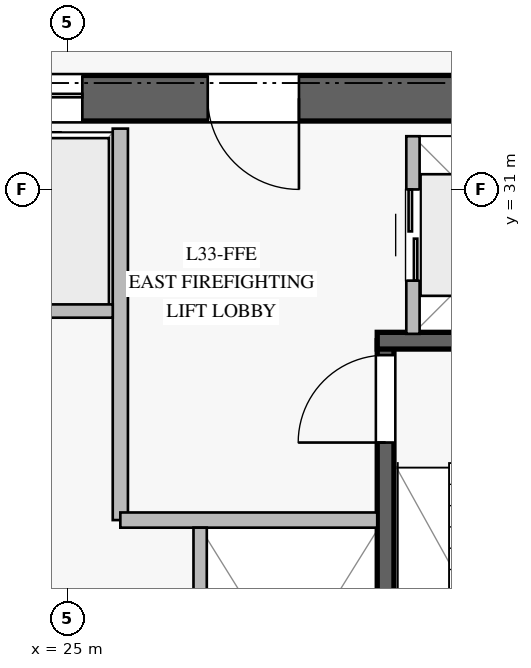
"""IFC4 building model, lengths in metres.
Left out: names, types, materials, properties, quantities, classifications, styles, units other than length and angle.
Written with IfcOpenShell. Run it as: python <this file> out.ifc"""

import sys

from ifc_helpers import new_model, si_unit, direction, frame, frame_2d, origin, place, context, subcontext, project, spatial, rectangle, extrude, element, fill, save


model = new_model("IFC4")
c1 = context("Model", 3, precision=1e-05, world=origin(), true_north=direction((0.0, 1.0)))
c2 = subcontext(c1, "Body", "Model", "MODEL_VIEW")
j1 = project(units=[si_unit("LENGTHUNIT", "METRE"), si_unit("PLANEANGLEUNIT", "RADIAN")], contexts=[c1])
p1 = place(None, origin())
s1 = spatial("IfcSite", under=j1, at=p1, CompositionType="ELEMENT")
p2 = place(p1, origin())
s2 = spatial("IfcBuilding", under=s1, at=p2, CompositionType="ELEMENT")
p3 = place(p2, frame((0.0, 0.0, 138.4)))
s3 = spatial("IfcBuildingStorey", under=s2, at=p3, CompositionType="ELEMENT", Elevation=138.4)
p4 = place(p3, frame((33.1, 32.2, 0.0), z_axis=(0.0, 0.0, 1.0), x_axis=(-1.0, 0.0, 0.0)))
e1 = element("IfcWall", 1, at=p4, inside=s3, PredefinedType="SHEAR", context=c2, shape_type="SweptSolid", body=[
    extrude(rectangle(XDim=16.2, YDim=0.6, at=frame_2d((8.1, 0.0))), origin(), (0.0, 0.0, 1.0), 3.76),
])
p5 = place(p4, frame((5.05, 0.0, 0.0)))
e2 = element("IfcOpeningElement", 2, at=p5, cuts=e1, PredefinedType="OPENING", context=c2, shape_type="SweptSolid", body=[
    extrude(rectangle(XDim=1.2, YDim=2.25, at=frame_2d((0.6, 1.125))), frame((0.0, 0.31, 0.0), z_axis=(0.0, -1.0, 0.0), x_axis=(1.0, 0.0, 0.0)), (0.0, 0.0, 1.0), 0.62),
])
p6 = place(p4, frame((11.85, 0.0, 0.0)))
e3 = element("IfcOpeningElement", 3, at=p6, cuts=e1, PredefinedType="OPENING", context=c2, shape_type="SweptSolid", body=[
    extrude(rectangle(XDim=1.1, YDim=2.2, at=frame_2d((0.55, 1.1))), frame((0.0, 0.31, 0.0), z_axis=(0.0, -1.0, 0.0), x_axis=(1.0, 0.0, 0.0)), (0.0, 0.0, 1.0), 0.62),
])
p7 = place(p4, frame((9.875, 0.0, 0.0)))
e4 = element("IfcOpeningElement", 4, at=p7, cuts=e1, PredefinedType="OPENING", context=c2, shape_type="SweptSolid", body=[
    extrude(rectangle(XDim=1.1, YDim=2.2, at=frame_2d((0.55, 1.1))), frame((0.0, 0.31, 0.0), z_axis=(0.0, -1.0, 0.0), x_axis=(1.0, 0.0, 0.0)), (0.0, 0.0, 1.0), 0.62),
])
p8 = place(p4, frame((7.9, 0.0, 0.0)))
e5 = element("IfcOpeningElement", 5, at=p8, cuts=e1, PredefinedType="OPENING", context=c2, shape_type="SweptSolid", body=[
    extrude(rectangle(XDim=1.1, YDim=2.2, at=frame_2d((0.55, 1.1))), frame((0.0, 0.31, 0.0), z_axis=(0.0, -1.0, 0.0), x_axis=(1.0, 0.0, 0.0)), (0.0, 0.0, 1.0), 0.62),
])
p9 = place(p3, frame((29.19, 21.79, 0.0), z_axis=(0.0, 0.0, 1.0), x_axis=(0.0, 1.0, 0.0)))
e6 = element("IfcWall", 6, at=p9, inside=s3, PredefinedType="SOLIDWALL", context=c2, shape_type="SweptSolid", body=[
    extrude(rectangle(XDim=7.22, YDim=0.22, at=frame_2d((3.61, 0.0))), origin(), (0.0, 0.0, 1.0), 3.76),
])
p10 = place(p9, frame((5.88, 0.0, 0.0)))
e7 = element("IfcOpeningElement", 7, at=p10, cuts=e6, PredefinedType="OPENING", context=c2, shape_type="SweptSolid", body=[
    extrude(rectangle(XDim=1.15, YDim=2.2, at=frame_2d((0.575, 1.1))), frame((0.0, 0.12, 0.0), z_axis=(0.0, -1.0, 0.0), x_axis=(1.0, 0.0, 0.0)), (0.0, 0.0, 1.0), 0.24),
])
p11 = place(p3, frame((29.08, 29.01, 0.0), z_axis=(0.0, 0.0, 1.0), x_axis=(1.0, 0.0, 0.0)))
e8 = element("IfcWall", 8, at=p11, inside=s3, PredefinedType="SOLIDWALL", context=c2, shape_type="SweptSolid", body=[
    extrude(rectangle(XDim=3.72, YDim=0.22, at=frame_2d((1.86, 0.0))), origin(), (0.0, 0.0, 1.0), 3.76),
])
p12 = place(p3, frame((25.7, 26.65, 0.0), z_axis=(0.0, 0.0, 1.0), x_axis=(0.0, 1.0, 0.0)))
e9 = element("IfcWall", 9, at=p12, inside=s3, PredefinedType="PARTITIONING", context=c2, shape_type="SweptSolid", body=[
    extrude(rectangle(XDim=5.15, YDim=0.2, at=frame_2d((2.575, 0.0))), origin(), (0.0, 0.0, 1.0), 3.76),
])
p13 = place(p3, frame((25.7, 26.65, 0.0), z_axis=(0.0, 0.0, 1.0), x_axis=(1.0, 0.0, 0.0)))
e10 = element("IfcWall", 10, at=p13, inside=s3, PredefinedType="PARTITIONING", context=c2, shape_type="SweptSolid", body=[
    extrude(rectangle(XDim=3.38, YDim=0.2, at=frame_2d((1.69, 0.0))), origin(), (0.0, 0.0, 1.0), 3.76),
])
for number, where, z_axis, x_axis in (
    (11, (23.7, 29.4, 0.0), (0.0, 0.0, 1.0), (1.0, 0.0, 0.0)),
    (12, (26.75, 24.65, 0.0), (0.0, 0.0, 1.0), (0.0, 1.0, 0.0)),
):
    element("IfcWall", number, at=place(p3, frame(where, z_axis=z_axis, x_axis=x_axis)), inside=s3, PredefinedType="PARTITIONING", context=c2, shape_type="SweptSolid", body=[
        extrude(rectangle(XDim=1.9, YDim=0.175, at=frame_2d((0.95, 0.0))), origin(), (0.0, 0.0, 1.0), 3.76),
    ])
p14 = place(p3, frame((29.55, 29.1, 0.0), z_axis=(0.0, 0.0, 1.0), x_axis=(0.0, 1.0, 0.0)))
e13 = element("IfcWall", 13, at=p14, inside=s3, PredefinedType="PARTITIONING", context=c2, shape_type="SweptSolid", body=[
    extrude(rectangle(XDim=2.6, YDim=0.175, at=frame_2d((1.3, 0.0))), origin(), (0.0, 0.0, 1.0), 3.76),
])
p15 = place(p14, frame((0.7, 0.0, 0.0)))
e14 = element("IfcOpeningElement", 14, at=p15, cuts=e13, PredefinedType="OPENING", context=c2, shape_type="SweptSolid", body=[
    extrude(rectangle(XDim=1.2, YDim=2.2, at=frame_2d((0.6, 1.1))), frame((0.0, 0.098, 0.0), z_axis=(0.0, -1.0, 0.0), x_axis=(1.0, 0.0, 0.0)), (0.0, 0.0, 1.0), 0.195),
])
p16 = place(p10, origin())
e15 = element("IfcDoor", 15, at=p16, inside=s3, OperationType="SINGLE_SWING_LEFT", PredefinedType="DOOR", context=c2, shape_type="SweptSolid", body=[
    extrude(rectangle(XDim=1.15, YDim=2.2, at=frame_2d((0.575, 1.1))), frame((0.0, 0.025, 0.0), z_axis=(0.0, -1.0, 0.0), x_axis=(1.0, 0.0, 0.0)), (0.0, 0.0, 1.0), 0.05),
])
fill(e7, e15)
p17 = place(p5, origin())
e16 = element("IfcDoor", 16, at=p17, inside=s3, OperationType="SINGLE_SWING_LEFT", PredefinedType="DOOR", context=c2, shape_type="SweptSolid", body=[
    extrude(rectangle(XDim=1.2, YDim=2.25, at=frame_2d((0.6, 1.125))), frame((0.0, 0.025, 0.0), z_axis=(0.0, -1.0, 0.0), x_axis=(1.0, 0.0, 0.0)), (0.0, 0.0, 1.0), 0.05),
])
fill(e2, e16)
p18 = place(p8, origin())
e17 = element("IfcDoor", 17, at=p18, inside=s3, OperationType="DOUBLE_DOOR_SLIDING", PredefinedType="DOOR", context=c2, shape_type="SweptSolid", body=[
    extrude(rectangle(XDim=1.1, YDim=2.2, at=frame_2d((0.55, 1.1))), frame((0.0, 0.025, 0.0), z_axis=(0.0, -1.0, 0.0), x_axis=(1.0, 0.0, 0.0)), (0.0, 0.0, 1.0), 0.05),
])
fill(e5, e17)
p19 = place(p15, origin())
e18 = element("IfcDoor", 18, at=p19, inside=s3, OperationType="DOUBLE_DOOR_SLIDING", PredefinedType="DOOR", context=c2, shape_type="SweptSolid", body=[
    extrude(rectangle(XDim=1.2, YDim=2.2, at=frame_2d((0.6, 1.1))), frame((0.0, 0.025, 0.0), z_axis=(0.0, -1.0, 0.0), x_axis=(1.0, 0.0, 0.0)), (0.0, 0.0, 1.0), 0.05),
])
fill(e14, e18)
save(model, sys.argv[1])
